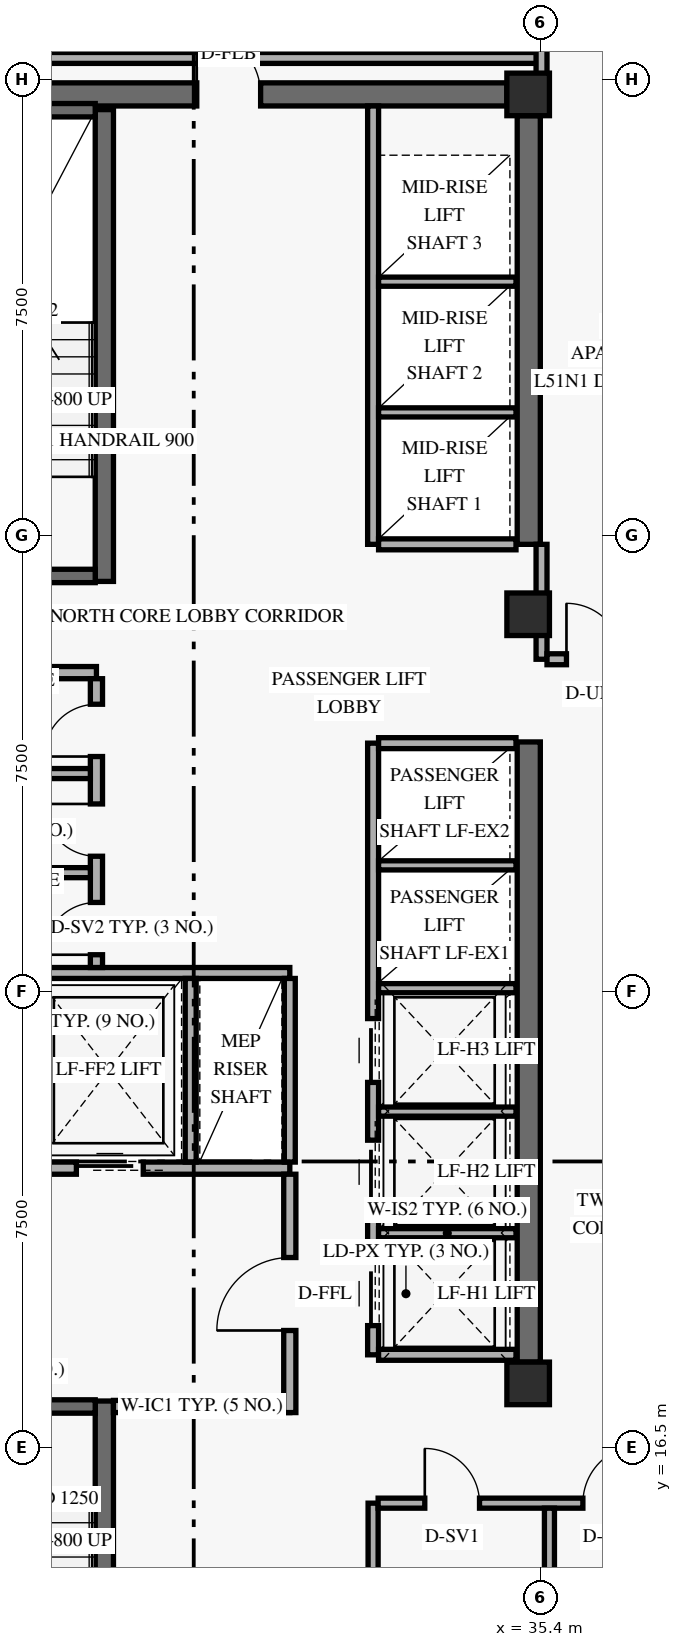
"""IFC4 building model, lengths in metres.
Left out: names, types, materials, properties, quantities, classifications, styles, units other than length and angle.
Written with IfcOpenShell. Run it as: python <this file> out.ifc"""

import sys

from ifc_helpers import new_model, si_unit, direction, frame, frame_2d, origin, origin_2d, place, context, subcontext, project, spatial, rectangle, extrude, element, fill, save


model = new_model("IFC4")
c1 = context("Model", 3, precision=1e-05, world=origin(), true_north=direction((0.0, 1.0)))
c2 = subcontext(c1, "Body", "Model", "MODEL_VIEW")
j1 = project(units=[si_unit("LENGTHUNIT", "METRE"), si_unit("PLANEANGLEUNIT", "RADIAN")], contexts=[c1])
p1 = place(None, origin())
s1 = spatial("IfcSite", under=j1, at=p1, CompositionType="ELEMENT")
p2 = place(p1, origin())
s2 = spatial("IfcBuilding", under=s1, at=p2, CompositionType="ELEMENT")
p3 = place(p2, frame((0.0, 0.0, 196.2)))
s3 = spatial("IfcBuildingStorey", under=s2, at=p3, CompositionType="ELEMENT", Elevation=196.2)
p4 = place(p3, frame((35.21, 17.9, 0.0), z_axis=(0.0, 0.0, 1.0), x_axis=(0.0, 1.0, 0.0)))
e1 = element("IfcWall", 1, at=p4, inside=s3, PredefinedType="SHEAR", context=c2, shape_type="SweptSolid", body=[
    extrude(rectangle(XDim=10.2, YDim=0.38, at=frame_2d((5.1, 0.0))), origin(), (0.0, 0.0, 1.0), 2.688),
])
p5 = place(p3, frame((35.21, 31.35, 0.0), z_axis=(0.0, 0.0, 1.0), x_axis=(0.0, 1.0, 0.0)))
e2 = element("IfcWall", 2, at=p5, inside=s3, PredefinedType="SHEAR", context=c2, shape_type="SweptSolid", body=[
    extrude(rectangle(XDim=7.05, YDim=0.38, at=frame_2d((3.525, 0.0))), origin(), (0.0, 0.0, 1.0), 2.688),
])
p6 = place(p3, frame((24.55, 38.75, 0.0), z_axis=(0.0, 0.0, 1.0), x_axis=(1.0, 0.0, 0.0)))
e3 = element("IfcWall", 3, at=p6, inside=s3, PredefinedType="SHEAR", context=c2, shape_type="SweptSolid", body=[
    extrude(rectangle(XDim=10.3, YDim=0.38, at=frame_2d((5.15, 0.0))), origin(), (0.0, 0.0, 1.0), 3.3),
])
p7 = place(p6, frame((5.2, 0.0, 0.0)))
e4 = element("IfcOpeningElement", 4, at=p7, cuts=e3, PredefinedType="OPENING", context=c2, shape_type="SweptSolid", body=[
    extrude(rectangle(XDim=1.05, YDim=2.15, at=frame_2d((0.525, 1.075))), frame((0.0, 0.2, 0.0), z_axis=(0.0, -1.0, 0.0), x_axis=(1.0, 0.0, 0.0)), (0.0, 0.0, 1.0), 0.4),
])
p8 = place(p3, frame((28.23, 9.5, 0.0), z_axis=(0.0, 0.0, 1.0), x_axis=(0.0, 1.0, 0.0)))
e5 = element("IfcWall", 5, at=p8, inside=s3, PredefinedType="SHEAR", context=c2, shape_type="SweptSolid", body=[
    extrude(rectangle(XDim=7.76, YDim=0.3, at=frame_2d((3.88, 0.0))), origin(), (0.0, 0.0, 1.0), 3.3),
])
p9 = place(p3, frame((24.92, 17.17, 0.0), z_axis=(0.0, 0.0, 1.0), x_axis=(1.0, 0.0, 0.0)))
e6 = element("IfcWall", 6, at=p9, inside=s3, PredefinedType="SHEAR", context=c2, shape_type="SweptSolid", body=[
    extrude(rectangle(XDim=3.16, YDim=0.22, at=frame_2d((1.58, 0.0))), origin(), (0.0, 0.0, 1.0), 3.3),
])
p10 = place(p9, frame((0.78, 0.0, 0.0)))
e7 = element("IfcOpeningElement", 7, at=p10, cuts=e6, PredefinedType="OPENING", context=c2, shape_type="SweptSolid", body=[
    extrude(rectangle(XDim=1.05, YDim=2.15, at=frame_2d((0.525, 1.075))), frame((0.0, 0.12, 0.0), z_axis=(0.0, -1.0, 0.0), x_axis=(1.0, 0.0, 0.0)), (0.0, 0.0, 1.0), 0.24),
])
p11 = place(p3, frame((28.23, 30.74, 0.0), z_axis=(0.0, 0.0, 1.0), x_axis=(0.0, 1.0, 0.0)))
e8 = element("IfcWall", 8, at=p11, inside=s3, PredefinedType="SHEAR", context=c2, shape_type="SweptSolid", body=[
    extrude(rectangle(XDim=7.76, YDim=0.3, at=frame_2d((3.88, 0.0))), origin(), (0.0, 0.0, 1.0), 3.3),
])
p12 = place(p3, frame((24.92, 30.83, 0.0), z_axis=(0.0, 0.0, 1.0), x_axis=(1.0, 0.0, 0.0)))
e9 = element("IfcWall", 9, at=p12, inside=s3, PredefinedType="SHEAR", context=c2, shape_type="SweptSolid", body=[
    extrude(rectangle(XDim=3.16, YDim=0.22, at=frame_2d((1.58, 0.0))), origin(), (0.0, 0.0, 1.0), 3.3),
])
p13 = place(p12, frame((0.78, 0.0, 0.0)))
e10 = element("IfcOpeningElement", 10, at=p13, cuts=e9, PredefinedType="OPENING", context=c2, shape_type="SweptSolid", body=[
    extrude(rectangle(XDim=1.05, YDim=2.15, at=frame_2d((0.525, 1.075))), frame((0.0, 0.12, 0.0), z_axis=(0.0, -1.0, 0.0), x_axis=(1.0, 0.0, 0.0)), (0.0, 0.0, 1.0), 0.24),
])
p14 = place(p3, frame((24.92, 38.49, 0.0), z_axis=(0.0, 0.0, 1.0), x_axis=(1.0, 0.0, 0.0)))
e11 = element("IfcWall", 11, at=p14, inside=s3, PredefinedType="SHEAR", context=c2, shape_type="SweptSolid", body=[
    extrude(rectangle(XDim=3.16, YDim=0.22, at=frame_2d((1.58, 0.0))), origin(), (0.0, 0.0, 1.0), 3.3),
])
for number, where, z_axis, x_axis in (
    (12, (35.2, 17.55, 0.0), (0.0, 0.0, 1.0), (1.0, 0.0, 0.0)),
    (13, (35.2, 30.2, 0.0), (0.0, 0.0, 1.0), (1.0, 0.0, 0.0)),
    (14, (35.2, 38.75, 0.0), (0.0, 0.0, 1.0), (1.0, 0.0, 0.0)),
):
    element("IfcColumn", number, at=place(p3, frame(where, z_axis=z_axis, x_axis=x_axis)), inside=s3, PredefinedType="COLUMN", context=c2, shape_type="SweptSolid", body=[
        extrude(rectangle(XDim=0.7, YDim=0.7, at=origin_2d()), origin(), (0.0, 0.0, 1.0), 3.6),
    ])
p15 = place(p3, frame((24.45, 21.09, 0.0), z_axis=(0.0, 0.0, 1.0), x_axis=(1.0, 0.0, 0.0)))
e15 = element("IfcWall", 15, at=p15, inside=s3, PredefinedType="STANDARD", context=c2, shape_type="SweptSolid", body=[
    extrude(rectangle(XDim=6.83, YDim=0.2, at=frame_2d((3.415, 0.0))), origin(), (0.0, 0.0, 1.0), 3.3),
])
p16 = place(p15, frame((0.72, 0.0, 0.0)))
e16 = element("IfcOpeningElement", 16, at=p16, cuts=e15, PredefinedType="OPENING", context=c2, shape_type="SweptSolid", body=[
    extrude(rectangle(XDim=1.1, YDim=2.2, at=frame_2d((0.55, 1.1))), frame((0.0, 0.11, 0.0), z_axis=(0.0, -1.0, 0.0), x_axis=(1.0, 0.0, 0.0)), (0.0, 0.0, 1.0), 0.22),
])
p17 = place(p15, frame((3.32, 0.0, 0.0)))
e17 = element("IfcOpeningElement", 17, at=p17, cuts=e15, PredefinedType="OPENING", context=c2, shape_type="SweptSolid", body=[
    extrude(rectangle(XDim=1.1, YDim=2.2, at=frame_2d((0.55, 1.1))), frame((0.0, 0.11, 0.0), z_axis=(0.0, -1.0, 0.0), x_axis=(1.0, 0.0, 0.0)), (0.0, 0.0, 1.0), 0.22),
])
p18 = place(p3, frame((28.38, 17.17, 0.0), z_axis=(0.0, 0.0, 1.0), x_axis=(1.0, 0.0, 0.0)))
e18 = element("IfcWall", 18, at=p18, inside=s3, PredefinedType="STANDARD", context=c2, shape_type="SweptSolid", body=[
    extrude(rectangle(XDim=2.9, YDim=0.2, at=frame_2d((1.45, 0.0))), origin(), (0.0, 0.0, 1.0), 3.3),
])
p19 = place(p3, frame((31.28, 17.07, 0.0), z_axis=(0.0, 0.0, 1.0), x_axis=(0.0, 1.0, 0.0)))
e19 = element("IfcWall", 19, at=p19, inside=s3, PredefinedType="STANDARD", context=c2, shape_type="SweptSolid", body=[
    extrude(rectangle(XDim=3.92, YDim=0.2, at=frame_2d((1.96, 0.0))), origin(), (0.0, 0.0, 1.0), 2.67),
])
p20 = place(p19, frame((1.35, 0.0, 0.0)))
e20 = element("IfcOpeningElement", 20, at=p20, cuts=e19, PredefinedType="OPENING", context=c2, shape_type="SweptSolid", body=[
    extrude(rectangle(XDim=1.2, YDim=2.15, at=frame_2d((0.6, 1.075))), frame((0.0, 0.11, 0.0), z_axis=(0.0, -1.0, 0.0), x_axis=(1.0, 0.0, 0.0)), (0.0, 0.0, 1.0), 0.22),
])
p21 = place(p3, frame((24.45, 24.3, 0.0), z_axis=(0.0, 0.0, 1.0), x_axis=(1.0, 0.0, 0.0)))
e21 = element("IfcWall", 21, at=p21, inside=s3, PredefinedType="STANDARD", context=c2, shape_type="SweptSolid", body=[
    extrude(rectangle(XDim=6.83, YDim=0.18, at=frame_2d((3.415, 0.0))), origin(), (0.0, 0.0, 1.0), 3.3),
])
for number, where, z_axis, x_axis in (
    (22, (29.65, 21.19, 0.0), (0.0, 0.0, 1.0), (0.0, 1.0, 0.0)),
    (23, (31.28, 21.19, 0.0), (0.0, 0.0, 1.0), (0.0, 1.0, 0.0)),
):
    element("IfcWall", number, at=place(p3, frame(where, z_axis=z_axis, x_axis=x_axis)), inside=s3, PredefinedType="STANDARD", context=c2, shape_type="SweptSolid", body=[
        extrude(rectangle(XDim=3.02, YDim=0.18, at=frame_2d((1.51, 0.0))), origin(), (0.0, 0.0, 1.0), 3.3),
    ])
p22 = place(p3, frame((24.45, 29.24, 0.0), z_axis=(0.0, 0.0, 1.0), x_axis=(1.0, 0.0, 0.0)))
e24 = element("IfcWall", 24, at=p22, inside=s3, PredefinedType="STANDARD", context=c2, shape_type="SweptSolid", body=[
    extrude(rectangle(XDim=3.65, YDim=0.2, at=frame_2d((1.825, 0.0))), origin(), (0.0, 0.0, 1.0), 3.3),
])
p23 = place(p3, frame((28.1, 24.39, 0.0), z_axis=(0.0, 0.0, 1.0), x_axis=(0.0, 1.0, 0.0)))
e25 = element("IfcWall", 25, at=p23, inside=s3, PredefinedType="STANDARD", context=c2, shape_type="SweptSolid", body=[
    extrude(rectangle(XDim=4.75, YDim=0.2, at=frame_2d((2.375, 0.0))), origin(), (0.0, 0.0, 1.0), 3.3),
])
p24 = place(p23, frame((0.21, 0.0, 0.0)))
e26 = element("IfcOpeningElement", 26, at=p24, cuts=e25, PredefinedType="OPENING", context=c2, shape_type="SweptSolid", body=[
    extrude(rectangle(XDim=0.86, YDim=2.1, at=frame_2d((0.43, 1.05))), frame((0.0, 0.11, 0.0), z_axis=(0.0, -1.0, 0.0), x_axis=(1.0, 0.0, 0.0)), (0.0, 0.0, 1.0), 0.22),
])
p25 = place(p23, frame((1.83, 0.0, 0.0)))
e27 = element("IfcOpeningElement", 27, at=p25, cuts=e25, PredefinedType="OPENING", context=c2, shape_type="SweptSolid", body=[
    extrude(rectangle(XDim=0.86, YDim=2.1, at=frame_2d((0.43, 1.05))), frame((0.0, 0.11, 0.0), z_axis=(0.0, -1.0, 0.0), x_axis=(1.0, 0.0, 0.0)), (0.0, 0.0, 1.0), 0.22),
])
p26 = place(p23, frame((3.47, 0.0, 0.0)))
e28 = element("IfcOpeningElement", 28, at=p26, cuts=e25, PredefinedType="OPENING", context=c2, shape_type="SweptSolid", body=[
    extrude(rectangle(XDim=0.86, YDim=2.1, at=frame_2d((0.43, 1.05))), frame((0.0, 0.11, 0.0), z_axis=(0.0, -1.0, 0.0), x_axis=(1.0, 0.0, 0.0)), (0.0, 0.0, 1.0), 0.22),
])
for number, where, z_axis, x_axis in (
    (29, (24.45, 25.95, 0.0), (0.0, 0.0, 1.0), (1.0, 0.0, 0.0)),
    (30, (24.45, 27.58, 0.0), (0.0, 0.0, 1.0), (1.0, 0.0, 0.0)),
):
    element("IfcWall", number, at=place(p3, frame(where, z_axis=z_axis, x_axis=x_axis)), inside=s3, PredefinedType="PARTITIONING", context=c2, shape_type="SweptSolid", body=[
        extrude(rectangle(XDim=3.55, YDim=0.165, at=frame_2d((1.775, 0.0))), origin(), (0.0, 0.0, 1.0), 3.3),
    ])
p27 = place(p3, frame((32.65, 18.02, 0.0), z_axis=(0.0, 0.0, 1.0), x_axis=(0.0, 1.0, 0.0)))
e31 = element("IfcWall", 31, at=p27, inside=s3, PredefinedType="STANDARD", context=c2, shape_type="SweptSolid", body=[
    extrude(rectangle(XDim=10.06, YDim=0.18, at=frame_2d((5.03, 0.0))), origin(), (0.0, 0.0, 1.0), 3.3),
])
p28 = place(p27, frame((0.48, 0.0, 0.0)))
e32 = element("IfcOpeningElement", 32, at=p28, cuts=e31, PredefinedType="OPENING", context=c2, shape_type="SweptSolid", body=[
    extrude(rectangle(XDim=1.05, YDim=2.2, at=frame_2d((0.525, 1.1))), frame((0.0, 0.1, 0.0), z_axis=(0.0, -1.0, 0.0), x_axis=(1.0, 0.0, 0.0)), (0.0, 0.0, 1.0), 0.2),
])
p29 = place(p27, frame((2.48, 0.0, 0.0)))
e33 = element("IfcOpeningElement", 33, at=p29, cuts=e31, PredefinedType="OPENING", context=c2, shape_type="SweptSolid", body=[
    extrude(rectangle(XDim=1.05, YDim=2.2, at=frame_2d((0.525, 1.1))), frame((0.0, 0.1, 0.0), z_axis=(0.0, -1.0, 0.0), x_axis=(1.0, 0.0, 0.0)), (0.0, 0.0, 1.0), 0.2),
])
p30 = place(p27, frame((4.48, 0.0, 0.0)))
e34 = element("IfcOpeningElement", 34, at=p30, cuts=e31, PredefinedType="OPENING", context=c2, shape_type="SweptSolid", body=[
    extrude(rectangle(XDim=1.05, YDim=2.2, at=frame_2d((0.525, 1.1))), frame((0.0, 0.1, 0.0), z_axis=(0.0, -1.0, 0.0), x_axis=(1.0, 0.0, 0.0)), (0.0, 0.0, 1.0), 0.2),
])
for number, where, z_axis, x_axis in (
    (35, (32.74, 18.02, 0.0), (0.0, 0.0, 1.0), (1.0, 0.0, 0.0)),
    (36, (32.74, 28.08, 0.0), (0.0, 0.0, 1.0), (1.0, 0.0, 0.0)),
):
    element("IfcWall", number, at=place(p3, frame(where, z_axis=z_axis, x_axis=x_axis)), inside=s3, PredefinedType="STANDARD", context=c2, shape_type="SweptSolid", body=[
        extrude(rectangle(XDim=2.26, YDim=0.18, at=frame_2d((1.13, 0.0))), origin(), (0.0, 0.0, 1.0), 3.3),
    ])
for number, where, z_axis, x_axis in (
    (37, (32.74, 20.02, 0.0), (0.0, 0.0, 1.0), (1.0, 0.0, 0.0)),
    (38, (32.74, 22.02, 0.0), (0.0, 0.0, 1.0), (1.0, 0.0, 0.0)),
    (39, (32.74, 24.05, 0.0), (0.0, 0.0, 1.0), (1.0, 0.0, 0.0)),
    (40, (32.74, 26.07, 0.0), (0.0, 0.0, 1.0), (1.0, 0.0, 0.0)),
):
    element("IfcWall", number, at=place(p3, frame(where, z_axis=z_axis, x_axis=x_axis)), inside=s3, PredefinedType="STANDARD", context=c2, shape_type="SweptSolid", body=[
        extrude(rectangle(XDim=2.26, YDim=0.15, at=frame_2d((1.13, 0.0))), origin(), (0.0, 0.0, 1.0), 3.3),
    ])
p31 = place(p3, frame((32.65, 31.35, 0.0), z_axis=(0.0, 0.0, 1.0), x_axis=(0.0, 1.0, 0.0)))
e41 = element("IfcWall", 41, at=p31, inside=s3, PredefinedType="STANDARD", context=c2, shape_type="SweptSolid", body=[
    extrude(rectangle(XDim=7.21, YDim=0.18, at=frame_2d((3.605, 0.0))), origin(), (0.0, 0.0, 1.0), 3.3),
])
p32 = place(p3, frame((32.74, 31.35, 0.0), z_axis=(0.0, 0.0, 1.0), x_axis=(1.0, 0.0, 0.0)))
e42 = element("IfcWall", 42, at=p32, inside=s3, PredefinedType="STANDARD", context=c2, shape_type="SweptSolid", body=[
    extrude(rectangle(XDim=2.26, YDim=0.18, at=frame_2d((1.13, 0.0))), origin(), (0.0, 0.0, 1.0), 3.3),
])
for number, where, z_axis, x_axis in (
    (43, (32.74, 33.52, 0.0), (0.0, 0.0, 1.0), (1.0, 0.0, 0.0)),
    (44, (32.74, 35.67, 0.0), (0.0, 0.0, 1.0), (1.0, 0.0, 0.0)),
):
    element("IfcWall", number, at=place(p3, frame(where, z_axis=z_axis, x_axis=x_axis)), inside=s3, PredefinedType="STANDARD", context=c2, shape_type="SweptSolid", body=[
        extrude(rectangle(XDim=2.26, YDim=0.15, at=frame_2d((1.13, 0.0))), origin(), (0.0, 0.0, 1.0), 3.3),
    ])
p33 = place(p3, frame((32.65, 9.5, 0.0), z_axis=(0.0, 0.0, 1.0), x_axis=(0.0, 1.0, 0.0)))
e45 = element("IfcWall", 45, at=p33, inside=s3, PredefinedType="PARTITIONING", context=c2, shape_type="SweptSolid", body=[
    extrude(rectangle(XDim=6.08, YDim=0.165, at=frame_2d((3.04, 0.0))), origin(), (0.0, 0.0, 1.0), 3.3),
])
p34 = place(p3, frame((32.732, 15.58, 0.0), z_axis=(0.0, 0.0, 1.0), x_axis=(1.0, 0.0, 0.0)))
e46 = element("IfcWall", 46, at=p34, inside=s3, PredefinedType="PARTITIONING", context=c2, shape_type="SweptSolid", body=[
    extrude(rectangle(XDim=5.618, YDim=0.165, at=frame_2d((2.809, 0.0))), origin(), (0.0, 0.0, 1.0), 2.67),
])
p35 = place(p34, frame((0.768, 0.0, 0.0)))
e47 = element("IfcOpeningElement", 47, at=p35, cuts=e46, PredefinedType="OPENING", context=c2, shape_type="SweptSolid", body=[
    extrude(rectangle(XDim=0.9, YDim=2.1, at=frame_2d((0.45, 1.05))), frame((0.0, 0.093, 0.0), z_axis=(0.0, -1.0, 0.0), x_axis=(1.0, 0.0, 0.0)), (0.0, 0.0, 1.0), 0.185),
])
p36 = place(p34, frame((3.367, 0.0, 0.0)))
e48 = element("IfcOpeningElement", 48, at=p36, cuts=e46, PredefinedType="OPENING", context=c2, shape_type="SweptSolid", body=[
    extrude(rectangle(XDim=0.95, YDim=2.15, at=frame_2d((0.475, 1.075))), frame((0.0, 0.093, 0.0), z_axis=(0.0, -1.0, 0.0), x_axis=(1.0, 0.0, 0.0)), (0.0, 0.0, 1.0), 0.185),
])
p37 = place(p3, frame((35.55, 9.5, 0.0), z_axis=(0.0, 0.0, 1.0), x_axis=(0.0, 1.0, 0.0)))
e49 = element("IfcWall", 49, at=p37, inside=s3, PredefinedType="PARTITIONING", context=c2, shape_type="SweptSolid", body=[
    extrude(rectangle(XDim=5.998, YDim=0.165, at=frame_2d((2.999, 0.0))), origin(), (0.0, 0.0, 1.0), 2.924),
])
p38 = place(p3, frame((35.42, 29.46, 0.0), z_axis=(0.0, 0.0, 1.0), x_axis=(0.0, 1.0, 0.0)))
e50 = element("IfcWall", 50, at=p38, inside=s3, PredefinedType="STANDARD", context=c2, shape_type="SweptSolid", body=[
    extrude(rectangle(XDim=1.89, YDim=0.18, at=frame_2d((0.945, 0.0))), origin(), (0.0, 0.0, 1.0), 2.67),
])
p39 = place(p3, frame((35.51, 29.46, 0.0), z_axis=(0.0, 0.0, 1.0), x_axis=(1.0, 0.0, 0.0)))
e51 = element("IfcWall", 51, at=p39, inside=s3, PredefinedType="STANDARD", context=c2, shape_type="SweptSolid", body=[
    extrude(rectangle(XDim=13.69, YDim=0.18, at=frame_2d((6.845, 0.0))), origin(), (0.0, 0.0, 1.0), 2.67),
])
p40 = place(p39, frame((0.32, 0.0, 0.0)))
e52 = element("IfcOpeningElement", 52, at=p40, cuts=e51, PredefinedType="OPENING", context=c2, shape_type="SweptSolid", body=[
    extrude(rectangle(XDim=0.92, YDim=2.15, at=frame_2d((0.46, 1.075))), frame((0.0, 0.1, 0.0), z_axis=(0.0, -1.0, 0.0), x_axis=(1.0, 0.0, 0.0)), (0.0, 0.0, 1.0), 0.2),
])
p41 = place(p3, frame((23.85, 39.35, 0.0), z_axis=(0.0, 0.0, 1.0), x_axis=(1.0, 0.0, 0.0)))
e53 = element("IfcWall", 53, at=p41, inside=s3, PredefinedType="STANDARD", context=c2, shape_type="SweptSolid", body=[
    extrude(rectangle(XDim=11.57, YDim=0.18, at=frame_2d((5.785, 0.0))), origin(), (0.0, 0.0, 1.0), 2.67),
])
p42 = place(p3, frame((35.42, 38.75, 0.0), z_axis=(0.0, 0.0, 1.0), x_axis=(0.0, 1.0, 0.0)))
e54 = element("IfcWall", 54, at=p42, inside=s3, PredefinedType="PARTITIONING", context=c2, shape_type="SweptSolid", body=[
    extrude(rectangle(XDim=4.97, YDim=0.18, at=frame_2d((2.485, 0.0))), origin(), (0.0, 0.0, 1.0), 2.67),
])
p43 = place(p17, origin())
e55 = element("IfcDoor", 55, at=p43, inside=s3, OperationType="SLIDING_TO_LEFT", PredefinedType="DOOR", context=c2, shape_type="SweptSolid", body=[
    extrude(rectangle(XDim=1.1, YDim=2.2, at=frame_2d((0.55, 1.1))), frame((0.0, 0.025, 0.0), z_axis=(0.0, -1.0, 0.0), x_axis=(1.0, 0.0, 0.0)), (0.0, 0.0, 1.0), 0.05),
])
fill(e17, e55)
p44 = place(p20, origin())
e56 = element("IfcDoor", 56, at=p44, inside=s3, OperationType="SINGLE_SWING_LEFT", PredefinedType="DOOR", context=c2, shape_type="SweptSolid", body=[
    extrude(rectangle(XDim=1.2, YDim=2.15, at=frame_2d((0.6, 1.075))), frame((0.0, 0.025, 0.0), z_axis=(0.0, -1.0, 0.0), x_axis=(1.0, 0.0, 0.0)), (0.0, 0.0, 1.0), 0.05),
])
fill(e20, e56)
p45 = place(p24, origin())
e57 = element("IfcDoor", 57, at=p45, inside=s3, OperationType="SINGLE_SWING_LEFT", PredefinedType="DOOR", context=c2, shape_type="SweptSolid", body=[
    extrude(rectangle(XDim=0.86, YDim=2.1, at=frame_2d((0.43, 1.05))), frame((0.0, 0.025, 0.0), z_axis=(0.0, -1.0, 0.0), x_axis=(1.0, 0.0, 0.0)), (0.0, 0.0, 1.0), 0.05),
])
fill(e26, e57)
p46 = place(p25, origin())
e58 = element("IfcDoor", 58, at=p46, inside=s3, OperationType="SINGLE_SWING_RIGHT", PredefinedType="DOOR", context=c2, shape_type="SweptSolid", body=[
    extrude(rectangle(XDim=0.86, YDim=2.1, at=frame_2d((0.43, 1.05))), frame((0.0, 0.025, 0.0), z_axis=(0.0, -1.0, 0.0), x_axis=(1.0, 0.0, 0.0)), (0.0, 0.0, 1.0), 0.05),
])
fill(e27, e58)
p47 = place(p26, origin())
e59 = element("IfcDoor", 59, at=p47, inside=s3, OperationType="SINGLE_SWING_LEFT", PredefinedType="DOOR", context=c2, shape_type="SweptSolid", body=[
    extrude(rectangle(XDim=0.86, YDim=2.1, at=frame_2d((0.43, 1.05))), frame((0.0, 0.025, 0.0), z_axis=(0.0, -1.0, 0.0), x_axis=(1.0, 0.0, 0.0)), (0.0, 0.0, 1.0), 0.05),
])
fill(e28, e59)
p48 = place(p28, origin())
e60 = element("IfcDoor", 60, at=p48, inside=s3, OperationType="SLIDING_TO_LEFT", PredefinedType="DOOR", context=c2, shape_type="SweptSolid", body=[
    extrude(rectangle(XDim=1.05, YDim=2.2, at=frame_2d((0.525, 1.1))), frame((0.0, 0.025, 0.0), z_axis=(0.0, -1.0, 0.0), x_axis=(1.0, 0.0, 0.0)), (0.0, 0.0, 1.0), 0.05),
])
fill(e32, e60)
p49 = place(p29, origin())
e61 = element("IfcDoor", 61, at=p49, inside=s3, OperationType="SLIDING_TO_LEFT", PredefinedType="DOOR", context=c2, shape_type="SweptSolid", body=[
    extrude(rectangle(XDim=1.05, YDim=2.2, at=frame_2d((0.525, 1.1))), frame((0.0, 0.025, 0.0), z_axis=(0.0, -1.0, 0.0), x_axis=(1.0, 0.0, 0.0)), (0.0, 0.0, 1.0), 0.05),
])
fill(e33, e61)
p50 = place(p30, origin())
e62 = element("IfcDoor", 62, at=p50, inside=s3, OperationType="SLIDING_TO_LEFT", PredefinedType="DOOR", context=c2, shape_type="SweptSolid", body=[
    extrude(rectangle(XDim=1.05, YDim=2.2, at=frame_2d((0.525, 1.1))), frame((0.0, 0.025, 0.0), z_axis=(0.0, -1.0, 0.0), x_axis=(1.0, 0.0, 0.0)), (0.0, 0.0, 1.0), 0.05),
])
fill(e34, e62)
p51 = place(p35, origin())
e63 = element("IfcDoor", 63, at=p51, inside=s3, OperationType="SINGLE_SWING_LEFT", PredefinedType="DOOR", context=c2, shape_type="SweptSolid", body=[
    extrude(rectangle(XDim=0.9, YDim=2.1, at=frame_2d((0.45, 1.05))), frame((0.0, 0.025, 0.0), z_axis=(0.0, -1.0, 0.0), x_axis=(1.0, 0.0, 0.0)), (0.0, 0.0, 1.0), 0.05),
])
fill(e47, e63)
p52 = place(p36, origin())
e64 = element("IfcDoor", 64, at=p52, inside=s3, OperationType="SINGLE_SWING_RIGHT", PredefinedType="DOOR", context=c2, shape_type="SweptSolid", body=[
    extrude(rectangle(XDim=0.95, YDim=2.15, at=frame_2d((0.475, 1.075))), frame((0.0, 0.025, 0.0), z_axis=(0.0, -1.0, 0.0), x_axis=(1.0, 0.0, 0.0)), (0.0, 0.0, 1.0), 0.05),
])
fill(e48, e64)
p53 = place(p7, frame((1.05, 0.0, 0.0), z_axis=(0.0, 0.0, 1.0), x_axis=(-1.0, 0.0, 0.0)))
e65 = element("IfcDoor", 65, at=p53, inside=s3, OperationType="SINGLE_SWING_RIGHT", PredefinedType="DOOR", context=c2, shape_type="SweptSolid", body=[
    extrude(rectangle(XDim=1.05, YDim=2.15, at=frame_2d((0.525, 1.075))), frame((0.0, 0.025, 0.0), z_axis=(0.0, -1.0, 0.0), x_axis=(1.0, 0.0, 0.0)), (0.0, 0.0, 1.0), 0.05),
])
fill(e4, e65)
p54 = place(p40, origin())
e66 = element("IfcDoor", 66, at=p54, inside=s3, OperationType="SINGLE_SWING_LEFT", PredefinedType="DOOR", context=c2, shape_type="SweptSolid", body=[
    extrude(rectangle(XDim=0.92, YDim=2.15, at=frame_2d((0.46, 1.075))), frame((0.0, 0.025, 0.0), z_axis=(0.0, -1.0, 0.0), x_axis=(1.0, 0.0, 0.0)), (0.0, 0.0, 1.0), 0.05),
])
fill(e52, e66)
save(model, sys.argv[1])
